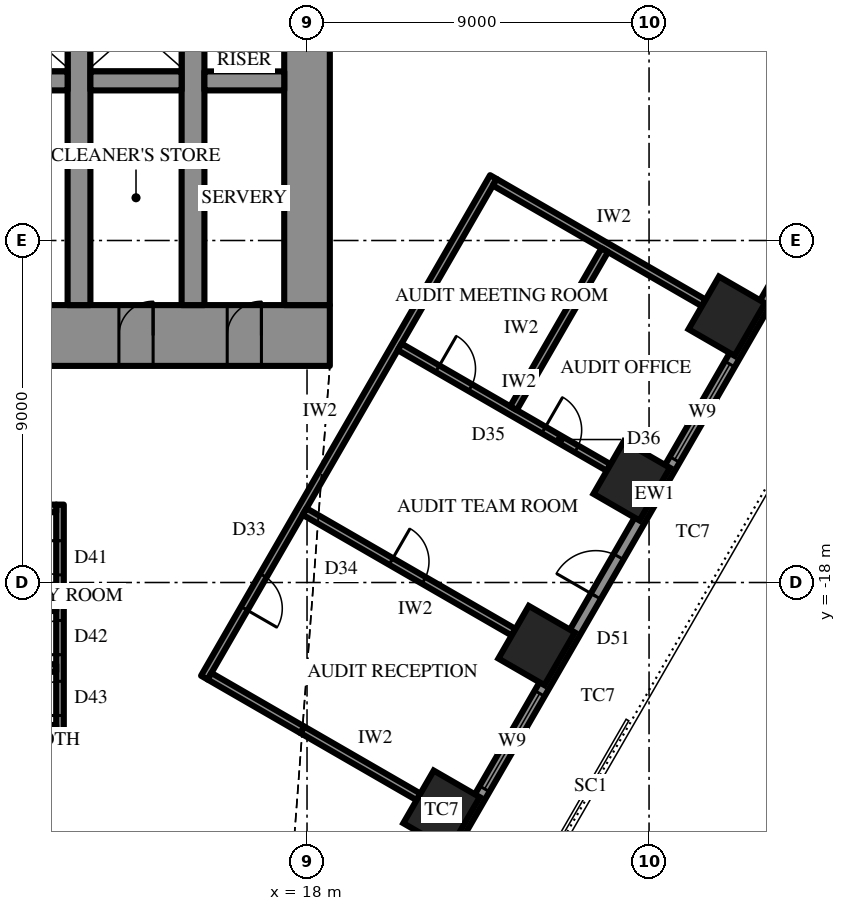
"""IFC4 building model, lengths in metres.
Left out: names, types, materials, properties, quantities, classifications, styles, units other than length and angle.
Written with IfcOpenShell. Run it as: python <this file> out.ifc"""

import sys

from ifc_helpers import new_model, si_unit, direction, frame, frame_2d, origin, origin_2d, place, context, subcontext, project, spatial, rectangle, extrude, element, fill, save


model = new_model("IFC4")
c1 = context("Model", 3, precision=1e-05, world=origin(), true_north=direction((0.0, 1.0)))
c2 = subcontext(c1, "Body", "Model", "MODEL_VIEW")
j1 = project(units=[si_unit("LENGTHUNIT", "METRE"), si_unit("PLANEANGLEUNIT", "RADIAN")], contexts=[c1])
p1 = place(None, origin())
s1 = spatial("IfcSite", under=j1, at=p1, CompositionType="ELEMENT")
p2 = place(p1, origin())
s2 = spatial("IfcBuilding", under=s1, at=p2, CompositionType="ELEMENT")
p3 = place(p2, frame((0.0, 0.0, 169.9)))
s3 = spatial("IfcBuildingStorey", under=s2, at=p3, CompositionType="ELEMENT", Elevation=169.9)
for number, where, z_axis, x_axis in (
    (1, (21.54, -23.992, 0.0), (0.0, 0.0, 1.0), (0.5, 0.866, 0.0)),
    (2, (24.042, -19.658, 0.0), (0.0, 0.0, 1.0), (0.5, 0.866, 0.0)),
    (3, (26.544, -15.325, 0.0), (0.0, 0.0, 1.0), (0.5, 0.866, 0.0)),
    (4, (29.045, -10.992, 0.0), (0.0, 0.0, 1.0), (0.5, 0.866, 0.0)),
):
    element("IfcColumn", number, at=place(p3, frame(where, z_axis=z_axis, x_axis=x_axis)), inside=s3, PredefinedType="COLUMN", context=c2, shape_type="SweptSolid", body=[
        extrude(rectangle(XDim=1.6, YDim=1.4, at=origin_2d()), origin(), (0.0, 0.0, 1.0), 4.2),
    ])
p4 = place(p3, frame((18.6, -11.5, 0.0), z_axis=(0.0, 0.0, 1.0), x_axis=(-1.0, 0.0, 0.0)))
e5 = element("IfcWall", 5, at=p4, inside=s3, PredefinedType="SHEAR", context=c2, shape_type="SweptSolid", body=[
    extrude(rectangle(XDim=37.2, YDim=1.6, at=frame_2d((18.6, 0.0))), origin(), (0.0, 0.0, 1.0), 4.2),
])
p5 = place(p4, frame((19.45, 0.0, 0.0)))
e6 = element("IfcOpeningElement", 6, at=p5, cuts=e5, PredefinedType="OPENING", context=c2, shape_type="SweptSolid", body=[
    extrude(rectangle(XDim=0.9, YDim=2.2, at=frame_2d((0.45, 1.1))), frame((0.0, 0.81, 0.0), z_axis=(0.0, -1.0, 0.0), x_axis=(1.0, 0.0, 0.0)), (0.0, 0.0, 1.0), 1.62),
])
p6 = place(p4, frame((22.45, 0.0, 0.0)))
e7 = element("IfcOpeningElement", 7, at=p6, cuts=e5, PredefinedType="OPENING", context=c2, shape_type="SweptSolid", body=[
    extrude(rectangle(XDim=0.9, YDim=2.2, at=frame_2d((0.45, 1.1))), frame((0.0, 0.81, 0.0), z_axis=(0.0, -1.0, 0.0), x_axis=(1.0, 0.0, 0.0)), (0.0, 0.0, 1.0), 1.62),
])
p7 = place(p4, frame((25.5, 0.0, 0.0)))
e8 = element("IfcOpeningElement", 8, at=p7, cuts=e5, PredefinedType="OPENING", context=c2, shape_type="SweptSolid", body=[
    extrude(rectangle(XDim=1.0, YDim=2.2, at=frame_2d((0.5, 1.1))), frame((0.0, 0.81, 0.0), z_axis=(0.0, -1.0, 0.0), x_axis=(1.0, 0.0, 0.0)), (0.0, 0.0, 1.0), 1.62),
])
p8 = place(p4, frame((1.8, 0.0, 0.0)))
e9 = element("IfcOpeningElement", 9, at=p8, cuts=e5, PredefinedType="OPENING", context=c2, shape_type="SweptSolid", body=[
    extrude(rectangle(XDim=0.9, YDim=2.2, at=frame_2d((0.45, 1.1))), frame((0.0, 0.81, 0.0), z_axis=(0.0, -1.0, 0.0), x_axis=(1.0, 0.0, 0.0)), (0.0, 0.0, 1.0), 1.62),
])
p9 = place(p4, frame((4.65, 0.0, 0.0)))
e10 = element("IfcOpeningElement", 10, at=p9, cuts=e5, PredefinedType="OPENING", context=c2, shape_type="SweptSolid", body=[
    extrude(rectangle(XDim=0.9, YDim=2.2, at=frame_2d((0.45, 1.1))), frame((0.0, 0.81, 0.0), z_axis=(0.0, -1.0, 0.0), x_axis=(1.0, 0.0, 0.0)), (0.0, 0.0, 1.0), 1.62),
])
p10 = place(p4, frame((7.75, 0.0, 0.0)))
e11 = element("IfcOpeningElement", 11, at=p10, cuts=e5, PredefinedType="OPENING", context=c2, shape_type="SweptSolid", body=[
    extrude(rectangle(XDim=0.9, YDim=2.2, at=frame_2d((0.45, 1.1))), frame((0.0, 0.81, 0.0), z_axis=(0.0, -1.0, 0.0), x_axis=(1.0, 0.0, 0.0)), (0.0, 0.0, 1.0), 1.62),
])
p11 = place(p4, frame((28.55, 0.0, 0.0)))
e12 = element("IfcOpeningElement", 12, at=p11, cuts=e5, PredefinedType="OPENING", context=c2, shape_type="SweptSolid", body=[
    extrude(rectangle(XDim=0.9, YDim=2.2, at=frame_2d((0.45, 1.1))), frame((0.0, 0.81, 0.0), z_axis=(0.0, -1.0, 0.0), x_axis=(1.0, 0.0, 0.0)), (0.0, 0.0, 1.0), 1.62),
])
p12 = place(p4, frame((31.65, 0.0, 0.0)))
e13 = element("IfcOpeningElement", 13, at=p12, cuts=e5, PredefinedType="OPENING", context=c2, shape_type="SweptSolid", body=[
    extrude(rectangle(XDim=0.9, YDim=2.2, at=frame_2d((0.45, 1.1))), frame((0.0, 0.81, 0.0), z_axis=(0.0, -1.0, 0.0), x_axis=(1.0, 0.0, 0.0)), (0.0, 0.0, 1.0), 1.62),
])
p13 = place(p4, frame((34.5, 0.0, 0.0)))
e14 = element("IfcOpeningElement", 14, at=p13, cuts=e5, PredefinedType="OPENING", context=c2, shape_type="SweptSolid", body=[
    extrude(rectangle(XDim=0.9, YDim=2.2, at=frame_2d((0.45, 1.1))), frame((0.0, 0.81, 0.0), z_axis=(0.0, -1.0, 0.0), x_axis=(1.0, 0.0, 0.0)), (0.0, 0.0, 1.0), 1.62),
])
p14 = place(p3, frame((18.0, -10.7, 0.0), z_axis=(0.0, 0.0, 1.0), x_axis=(0.0, 1.0, 0.0)))
e15 = element("IfcWall", 15, at=p14, inside=s3, PredefinedType="SHEAR", context=c2, shape_type="SweptSolid", body=[
    extrude(rectangle(XDim=21.4, YDim=1.2, at=frame_2d((10.7, 0.0))), origin(), (0.0, 0.0, 1.0), 4.2),
])
p15 = place(p14, frame((9.8, 0.0, 0.0)))
e16 = element("IfcOpeningElement", 16, at=p15, cuts=e15, PredefinedType="OPENING", context=c2, shape_type="SweptSolid", body=[
    extrude(rectangle(XDim=1.8, YDim=2.4, at=frame_2d((0.9, 1.2))), frame((0.0, 0.61, 0.0), z_axis=(0.0, -1.0, 0.0), x_axis=(1.0, 0.0, 0.0)), (0.0, 0.0, 1.0), 1.22),
])
p16 = place(p3, frame((12.0, -10.7, 0.0), z_axis=(0.0, 0.0, 1.0), x_axis=(0.0, 1.0, 0.0)))
e17 = element("IfcWall", 17, at=p16, inside=s3, PredefinedType="SHEAR", context=c2, shape_type="SweptSolid", body=[
    extrude(rectangle(XDim=21.4, YDim=0.6, at=frame_2d((10.7, 0.0))), origin(), (0.0, 0.0, 1.0), 4.2),
])
p17 = place(p16, frame((9.8, 0.0, 0.0)))
e18 = element("IfcOpeningElement", 18, at=p17, cuts=e17, PredefinedType="OPENING", context=c2, shape_type="SweptSolid", body=[
    extrude(rectangle(XDim=1.8, YDim=2.4, at=frame_2d((0.9, 1.2))), frame((0.0, 0.31, 0.0), z_axis=(0.0, -1.0, 0.0), x_axis=(1.0, 0.0, 0.0)), (0.0, 0.0, 1.0), 0.62),
])
p18 = place(p3, frame((15.0, -10.7, 0.0), z_axis=(0.0, 0.0, 1.0), x_axis=(0.0, 1.0, 0.0)))
e19 = element("IfcWall", 19, at=p18, inside=s3, PredefinedType="SHEAR", context=c2, shape_type="SweptSolid", body=[
    extrude(rectangle(XDim=21.4, YDim=0.6, at=frame_2d((10.7, 0.0))), origin(), (0.0, 0.0, 1.0), 4.2),
])
p19 = place(p18, frame((9.8, 0.0, 0.0)))
e20 = element("IfcOpeningElement", 20, at=p19, cuts=e19, PredefinedType="OPENING", context=c2, shape_type="SweptSolid", body=[
    extrude(rectangle(XDim=1.8, YDim=2.4, at=frame_2d((0.9, 1.2))), frame((0.0, 0.31, 0.0), z_axis=(0.0, -1.0, 0.0), x_axis=(1.0, 0.0, 0.0)), (0.0, 0.0, 1.0), 0.62),
])
p20 = place(p3, frame((17.4, -4.8, 0.0), z_axis=(0.0, 0.0, 1.0), x_axis=(-1.0, 0.0, 0.0)))
e21 = element("IfcWall", 21, at=p20, inside=s3, PredefinedType="SHEAR", context=c2, shape_type="SweptSolid", body=[
    extrude(rectangle(XDim=2.1, YDim=0.5, at=frame_2d((1.05, 0.0))), origin(), (0.0, 0.0, 1.0), 4.2),
])
p21 = place(p3, frame((14.7, -4.8, 0.0), z_axis=(0.0, 0.0, 1.0), x_axis=(-1.0, 0.0, 0.0)))
e22 = element("IfcWall", 22, at=p21, inside=s3, PredefinedType="SHEAR", context=c2, shape_type="SweptSolid", body=[
    extrude(rectangle(XDim=2.4, YDim=0.5, at=frame_2d((1.2, 0.0))), origin(), (0.0, 0.0, 1.0), 4.2),
])
p22 = place(p3, frame((11.7, -4.8, 0.0), z_axis=(0.0, 0.0, 1.0), x_axis=(-1.0, 0.0, 0.0)))
e23 = element("IfcWall", 23, at=p22, inside=s3, PredefinedType="SHEAR", context=c2, shape_type="SweptSolid", body=[
    extrude(rectangle(XDim=23.4, YDim=0.5, at=frame_2d((11.7, 0.0))), origin(), (0.0, 0.0, 1.0), 4.2),
])
p23 = place(p22, frame((6.6, 0.0, 0.0)))
e24 = element("IfcOpeningElement", 24, at=p23, cuts=e23, PredefinedType="OPENING", context=c2, shape_type="SweptSolid", body=[
    extrude(rectangle(XDim=1.2, YDim=2.2, at=frame_2d((0.6, 1.1))), frame((0.0, 0.26, 0.0), z_axis=(0.0, -1.0, 0.0), x_axis=(1.0, 0.0, 0.0)), (0.0, 0.0, 1.0), 0.52),
])
p24 = place(p22, frame((3.6, 0.0, 0.0)))
e25 = element("IfcOpeningElement", 25, at=p24, cuts=e23, PredefinedType="OPENING", context=c2, shape_type="SweptSolid", body=[
    extrude(rectangle(XDim=1.2, YDim=2.2, at=frame_2d((0.6, 1.1))), frame((0.0, 0.26, 0.0), z_axis=(0.0, -1.0, 0.0), x_axis=(1.0, 0.0, 0.0)), (0.0, 0.0, 1.0), 0.52),
])
p25 = place(p3, frame((19.644, -28.675, 0.0), z_axis=(0.0, 0.0, 1.0), x_axis=(0.500003084452, 0.866023622968, 0.0)))
e26 = element("IfcWall", 26, at=p25, inside=s3, PredefinedType="SOLIDWALL", context=c2, shape_type="SweptSolid", body=[
    extrude(rectangle(XDim=30.022, YDim=0.3, at=frame_2d((15.011, 0.0))), origin(), (0.0, 0.0, 1.0), 2.75),
])
p26 = place(p25, frame((1.052, 0.0, 0.6)))
e27 = element("IfcOpeningElement", 27, at=p26, cuts=e26, PredefinedType="OPENING", context=c2, shape_type="SweptSolid", body=[
    extrude(rectangle(XDim=2.9, YDim=1.9, at=frame_2d((1.45, 0.95))), frame((0.0, 0.16, 0.0), z_axis=(0.0, -1.0, 0.0), x_axis=(1.0, 0.0, 0.0)), (0.0, 0.0, 1.0), 0.32),
])
p27 = place(p25, frame((6.056, 0.0, 0.6)))
e28 = element("IfcOpeningElement", 28, at=p27, cuts=e26, PredefinedType="OPENING", context=c2, shape_type="SweptSolid", body=[
    extrude(rectangle(XDim=2.9, YDim=1.9, at=frame_2d((1.45, 0.95))), frame((0.0, 0.16, 0.0), z_axis=(0.0, -1.0, 0.0), x_axis=(1.0, 0.0, 0.0)), (0.0, 0.0, 1.0), 0.32),
])
p28 = place(p25, frame((11.909, 0.0, 0.0)))
e29 = element("IfcOpeningElement", 29, at=p28, cuts=e26, PredefinedType="OPENING", context=c2, shape_type="SweptSolid", body=[
    extrude(rectangle(XDim=1.2, YDim=2.4, at=frame_2d((0.6, 1.2))), frame((0.0, 0.16, 0.0), z_axis=(0.0, -1.0, 0.0), x_axis=(1.0, 0.0, 0.0)), (0.0, 0.0, 1.0), 0.32),
])
p29 = place(p25, frame((16.063, 0.0, 0.6)))
e30 = element("IfcOpeningElement", 30, at=p29, cuts=e26, PredefinedType="OPENING", context=c2, shape_type="SweptSolid", body=[
    extrude(rectangle(XDim=2.9, YDim=1.9, at=frame_2d((1.45, 0.95))), frame((0.0, 0.16, 0.0), z_axis=(0.0, -1.0, 0.0), x_axis=(1.0, 0.0, 0.0)), (0.0, 0.0, 1.0), 0.32),
])
p30 = place(p25, frame((21.067, 0.0, 0.6)))
e31 = element("IfcOpeningElement", 31, at=p30, cuts=e26, PredefinedType="OPENING", context=c2, shape_type="SweptSolid", body=[
    extrude(rectangle(XDim=2.9, YDim=1.9, at=frame_2d((1.45, 0.95))), frame((0.0, 0.16, 0.0), z_axis=(0.0, -1.0, 0.0), x_axis=(1.0, 0.0, 0.0)), (0.0, 0.0, 1.0), 0.32),
])
p31 = place(p25, frame((26.07, 0.0, 0.6)))
e32 = element("IfcOpeningElement", 32, at=p31, cuts=e26, PredefinedType="OPENING", context=c2, shape_type="SweptSolid", body=[
    extrude(rectangle(XDim=2.9, YDim=1.9, at=frame_2d((1.45, 0.95))), frame((0.0, 0.16, 0.0), z_axis=(0.0, -1.0, 0.0), x_axis=(1.0, 0.0, 0.0)), (0.0, 0.0, 1.0), 0.32),
])
p32 = place(p3, frame((15.298, -20.503, 0.0), z_axis=(0.0, 0.0, 1.0), x_axis=(0.500010972563, 0.86601906868, 0.0)))
e33 = element("IfcWall", 33, at=p32, inside=s3, PredefinedType="PARTITIONING", context=c2, shape_type="SweptSolid", body=[
    extrude(rectangle(XDim=15.211, YDim=0.2, at=frame_2d((7.605, 0.0))), origin(), (0.0, 0.0, 1.0), 4.0),
])
p33 = place(p32, frame((2.102, 0.0, 0.0)))
e34 = element("IfcOpeningElement", 34, at=p33, cuts=e33, PredefinedType="OPENING", context=c2, shape_type="SweptSolid", body=[
    extrude(rectangle(XDim=1.0, YDim=2.2, at=frame_2d((0.5, 1.1))), frame((0.0, 0.11, 0.0), z_axis=(0.0, -1.0, 0.0), x_axis=(1.0, 0.0, 0.0)), (0.0, 0.0, 1.0), 0.22),
])
p34 = place(p3, frame((15.435, -20.467, 0.0), z_axis=(0.0, 0.0, 1.0), x_axis=(0.866008320966, -0.500029587143, 0.0)))
e35 = element("IfcWall", 35, at=p34, inside=s3, PredefinedType="PARTITIONING", context=c2, shape_type="SweptSolid", body=[
    extrude(rectangle(XDim=2.821, YDim=0.2, at=frame_2d((1.411, 0.0))), origin(), (0.0, 0.0, 1.0), 4.0),
])
p35 = place(p3, frame((17.878, -21.877, 0.0), z_axis=(0.0, 0.0, 1.0), x_axis=(0.866033512162, -0.499985955615, 0.0)))
e36 = element("IfcWall", 36, at=p35, inside=s3, PredefinedType="PARTITIONING", context=c2, shape_type="SweptSolid", body=[
    extrude(rectangle(XDim=3.529, YDim=0.2, at=frame_2d((1.764, 0.0))), origin(), (0.0, 0.0, 1.0), 3.082),
])
p36 = place(p3, frame((17.936, -16.133, 0.0), z_axis=(0.0, 0.0, 1.0), x_axis=(0.866022320763, -0.500005339912, 0.0)))
e37 = element("IfcWall", 37, at=p36, inside=s3, PredefinedType="PARTITIONING", context=c2, shape_type="SweptSolid", body=[
    extrude(rectangle(XDim=6.35, YDim=0.2, at=frame_2d((3.175, 0.0))), origin(), (0.0, 0.0, 1.0), 3.082),
])
p37 = place(p36, frame((2.625, 0.0, 0.0)))
e38 = element("IfcOpeningElement", 38, at=p37, cuts=e37, PredefinedType="OPENING", context=c2, shape_type="SweptSolid", body=[
    extrude(rectangle(XDim=1.0, YDim=2.2, at=frame_2d((0.5, 1.1))), frame((0.0, 0.11, 0.0), z_axis=(0.0, -1.0, 0.0), x_axis=(1.0, 0.0, 0.0)), (0.0, 0.0, 1.0), 0.22),
])
p38 = place(p3, frame((20.438, -11.8, 0.0), z_axis=(0.0, 0.0, 1.0), x_axis=(0.866022320763, -0.500005339912, 0.0)))
e39 = element("IfcWall", 39, at=p38, inside=s3, PredefinedType="PARTITIONING", context=c2, shape_type="SweptSolid", body=[
    extrude(rectangle(XDim=6.35, YDim=0.2, at=frame_2d((3.175, 0.0))), origin(), (0.0, 0.0, 1.0), 4.0),
])
p39 = place(p38, frame((1.15, 0.0, 0.0)))
e40 = element("IfcOpeningElement", 40, at=p39, cuts=e39, PredefinedType="OPENING", context=c2, shape_type="SweptSolid", body=[
    extrude(rectangle(XDim=1.0, YDim=2.2, at=frame_2d((0.5, 1.1))), frame((0.0, 0.11, 0.0), z_axis=(0.0, -1.0, 0.0), x_axis=(1.0, 0.0, 0.0)), (0.0, 0.0, 1.0), 0.22),
])
p40 = place(p38, frame((4.375, 0.0, 0.0)))
e41 = element("IfcOpeningElement", 41, at=p40, cuts=e39, PredefinedType="OPENING", context=c2, shape_type="SweptSolid", body=[
    extrude(rectangle(XDim=1.0, YDim=2.2, at=frame_2d((0.5, 1.1))), frame((0.0, 0.11, 0.0), z_axis=(0.0, -1.0, 0.0), x_axis=(1.0, 0.0, 0.0)), (0.0, 0.0, 1.0), 0.22),
])
p41 = place(p3, frame((22.94, -7.467, 0.0), z_axis=(0.0, 0.0, 1.0), x_axis=(0.866022320763, -0.500005339912, 0.0)))
e42 = element("IfcWall", 42, at=p41, inside=s3, PredefinedType="PARTITIONING", context=c2, shape_type="SweptSolid", body=[
    extrude(rectangle(XDim=6.35, YDim=0.2, at=frame_2d((3.175, 0.0))), origin(), (0.0, 0.0, 1.0), 3.082),
])
p42 = place(p3, frame((23.433, -13.413, 0.0), z_axis=(0.0, 0.0, 1.0), x_axis=(0.499998147991, 0.86602647304, 0.0)))
e43 = element("IfcWall", 43, at=p42, inside=s3, PredefinedType="PARTITIONING", context=c2, shape_type="SweptSolid", body=[
    extrude(rectangle(XDim=4.804, YDim=0.2, at=frame_2d((2.402, 0.0))), origin(), (0.0, 0.0, 1.0), 4.0),
])
p43 = place(p3, frame((11.5, -15.95, 0.0), z_axis=(0.0, 0.0, 1.0), x_axis=(0.0, -1.0, 0.0)))
e44 = element("IfcWall", 44, at=p43, inside=s3, PredefinedType="PARTITIONING", context=c2, shape_type="SweptSolid", body=[
    extrude(rectangle(XDim=6.0, YDim=0.2, at=frame_2d((3.0, 0.0))), origin(), (0.0, 0.0, 1.0), 4.0),
])
p44 = place(p43, frame((0.95, 0.0, 0.0)))
e45 = element("IfcOpeningElement", 45, at=p44, cuts=e44, PredefinedType="OPENING", context=c2, shape_type="SweptSolid", body=[
    extrude(rectangle(XDim=0.9, YDim=2.2, at=frame_2d((0.45, 1.1))), frame((0.0, 0.11, 0.0), z_axis=(0.0, -1.0, 0.0), x_axis=(1.0, 0.0, 0.0)), (0.0, 0.0, 1.0), 0.22),
])
p45 = place(p43, frame((3.05, 0.0, 0.0)))
e46 = element("IfcOpeningElement", 46, at=p45, cuts=e44, PredefinedType="OPENING", context=c2, shape_type="SweptSolid", body=[
    extrude(rectangle(XDim=0.9, YDim=2.2, at=frame_2d((0.45, 1.1))), frame((0.0, 0.11, 0.0), z_axis=(0.0, -1.0, 0.0), x_axis=(1.0, 0.0, 0.0)), (0.0, 0.0, 1.0), 0.22),
])
p46 = place(p43, frame((4.65, 0.0, 0.0)))
e47 = element("IfcOpeningElement", 47, at=p46, cuts=e44, PredefinedType="OPENING", context=c2, shape_type="SweptSolid", body=[
    extrude(rectangle(XDim=0.9, YDim=2.2, at=frame_2d((0.45, 1.1))), frame((0.0, 0.11, 0.0), z_axis=(0.0, -1.0, 0.0), x_axis=(1.0, 0.0, 0.0)), (0.0, 0.0, 1.0), 0.22),
])
for number, where, z_axis, x_axis in (
    (48, (9.1, -16.05, 0.0), (0.0, 0.0, 1.0), (1.0, 0.0, 0.0)),
    (49, (9.1, -18.65, 0.0), (0.0, 0.0, 1.0), (1.0, 0.0, 0.0)),
    (50, (9.1, -20.25, 0.0), (0.0, 0.0, 1.0), (1.0, 0.0, 0.0)),
    (51, (9.1, -21.85, 0.0), (0.0, 0.0, 1.0), (1.0, 0.0, 0.0)),
):
    element("IfcWall", number, at=place(p3, frame(where, z_axis=z_axis, x_axis=x_axis)), inside=s3, PredefinedType="PARTITIONING", context=c2, shape_type="SweptSolid", body=[
        extrude(rectangle(XDim=2.3, YDim=0.2, at=frame_2d((1.15, 0.0))), origin(), (0.0, 0.0, 1.0), 4.0),
    ])
p47 = place(p27, origin())
e52 = element("IfcWindow", 52, at=p47, inside=s3, PartitioningType="SINGLE_PANEL", PredefinedType="WINDOW", context=c2, shape_type="SweptSolid", body=[
    extrude(rectangle(XDim=2.9, YDim=1.9, at=frame_2d((1.45, 0.95))), frame((0.0, 0.03, 0.0), z_axis=(0.0, -1.0, 0.0), x_axis=(1.0, 0.0, 0.0)), (0.0, 0.0, 1.0), 0.06),
])
fill(e28, e52)
p48 = place(p28, origin())
e53 = element("IfcDoor", 53, at=p48, inside=s3, OperationType="SINGLE_SWING_RIGHT", PredefinedType="DOOR", context=c2, shape_type="SweptSolid", body=[
    extrude(rectangle(XDim=1.2, YDim=2.4, at=frame_2d((0.6, 1.2))), frame((0.0, 0.025, 0.0), z_axis=(0.0, -1.0, 0.0), x_axis=(1.0, 0.0, 0.0)), (0.0, 0.0, 1.0), 0.05),
])
fill(e29, e53)
p49 = place(p29, origin())
e54 = element("IfcWindow", 54, at=p49, inside=s3, PartitioningType="SINGLE_PANEL", PredefinedType="WINDOW", context=c2, shape_type="SweptSolid", body=[
    extrude(rectangle(XDim=2.9, YDim=1.9, at=frame_2d((1.45, 0.95))), frame((0.0, 0.03, 0.0), z_axis=(0.0, -1.0, 0.0), x_axis=(1.0, 0.0, 0.0)), (0.0, 0.0, 1.0), 0.06),
])
fill(e30, e54)
p50 = place(p8, frame((0.9, 0.0, 0.0), z_axis=(0.0, 0.0, 1.0), x_axis=(-1.0, 0.0, 0.0)))
e55 = element("IfcDoor", 55, at=p50, inside=s3, OperationType="SINGLE_SWING_LEFT", PredefinedType="DOOR", context=c2, shape_type="SweptSolid", body=[
    extrude(rectangle(XDim=0.9, YDim=2.2, at=frame_2d((0.45, 1.1))), frame((0.0, 0.025, 0.0), z_axis=(0.0, -1.0, 0.0), x_axis=(1.0, 0.0, 0.0)), (0.0, 0.0, 1.0), 0.05),
])
fill(e9, e55)
p51 = place(p9, frame((0.9, 0.0, 0.0), z_axis=(0.0, 0.0, 1.0), x_axis=(-1.0, 0.0, 0.0)))
e56 = element("IfcDoor", 56, at=p51, inside=s3, OperationType="SINGLE_SWING_LEFT", PredefinedType="DOOR", context=c2, shape_type="SweptSolid", body=[
    extrude(rectangle(XDim=0.9, YDim=2.2, at=frame_2d((0.45, 1.1))), frame((0.0, 0.025, 0.0), z_axis=(0.0, -1.0, 0.0), x_axis=(1.0, 0.0, 0.0)), (0.0, 0.0, 1.0), 0.05),
])
fill(e10, e56)
p52 = place(p33, frame((1.0, 0.0, 0.0), z_axis=(0.0, 0.0, 1.0), x_axis=(-1.0, 0.0, 0.0)))
e57 = element("IfcDoor", 57, at=p52, inside=s3, OperationType="SINGLE_SWING_LEFT", PredefinedType="DOOR", context=c2, shape_type="SweptSolid", body=[
    extrude(rectangle(XDim=1.0, YDim=2.2, at=frame_2d((0.5, 1.1))), frame((0.0, 0.025, 0.0), z_axis=(0.0, -1.0, 0.0), x_axis=(1.0, 0.0, 0.0)), (0.0, 0.0, 1.0), 0.05),
])
fill(e34, e57)
p53 = place(p37, origin())
e58 = element("IfcDoor", 58, at=p53, inside=s3, OperationType="SINGLE_SWING_RIGHT", PredefinedType="DOOR", context=c2, shape_type="SweptSolid", body=[
    extrude(rectangle(XDim=1.0, YDim=2.2, at=frame_2d((0.5, 1.1))), frame((0.0, 0.025, 0.0), z_axis=(0.0, -1.0, 0.0), x_axis=(1.0, 0.0, 0.0)), (0.0, 0.0, 1.0), 0.05),
])
fill(e38, e58)
p54 = place(p39, origin())
e59 = element("IfcDoor", 59, at=p54, inside=s3, OperationType="SINGLE_SWING_RIGHT", PredefinedType="DOOR", context=c2, shape_type="SweptSolid", body=[
    extrude(rectangle(XDim=1.0, YDim=2.2, at=frame_2d((0.5, 1.1))), frame((0.0, 0.025, 0.0), z_axis=(0.0, -1.0, 0.0), x_axis=(1.0, 0.0, 0.0)), (0.0, 0.0, 1.0), 0.05),
])
fill(e40, e59)
p55 = place(p40, origin())
e60 = element("IfcDoor", 60, at=p55, inside=s3, OperationType="SINGLE_SWING_RIGHT", PredefinedType="DOOR", context=c2, shape_type="SweptSolid", body=[
    extrude(rectangle(XDim=1.0, YDim=2.2, at=frame_2d((0.5, 1.1))), frame((0.0, 0.025, 0.0), z_axis=(0.0, -1.0, 0.0), x_axis=(1.0, 0.0, 0.0)), (0.0, 0.0, 1.0), 0.05),
])
fill(e41, e60)
p56 = place(p44, frame((0.9, 0.0, 0.0), z_axis=(0.0, 0.0, 1.0), x_axis=(-1.0, 0.0, 0.0)))
e61 = element("IfcDoor", 61, at=p56, inside=s3, OperationType="SINGLE_SWING_LEFT", PredefinedType="DOOR", context=c2, shape_type="SweptSolid", body=[
    extrude(rectangle(XDim=0.9, YDim=2.2, at=frame_2d((0.45, 1.1))), frame((0.0, 0.025, 0.0), z_axis=(0.0, -1.0, 0.0), x_axis=(1.0, 0.0, 0.0)), (0.0, 0.0, 1.0), 0.05),
])
fill(e45, e61)
p57 = place(p45, frame((0.9, 0.0, 0.0), z_axis=(0.0, 0.0, 1.0), x_axis=(-1.0, 0.0, 0.0)))
e62 = element("IfcDoor", 62, at=p57, inside=s3, OperationType="SINGLE_SWING_RIGHT", PredefinedType="DOOR", context=c2, shape_type="SweptSolid", body=[
    extrude(rectangle(XDim=0.9, YDim=2.2, at=frame_2d((0.45, 1.1))), frame((0.0, 0.025, 0.0), z_axis=(0.0, -1.0, 0.0), x_axis=(1.0, 0.0, 0.0)), (0.0, 0.0, 1.0), 0.05),
])
fill(e46, e62)
p58 = place(p46, frame((0.9, 0.0, 0.0), z_axis=(0.0, 0.0, 1.0), x_axis=(-1.0, 0.0, 0.0)))
e63 = element("IfcDoor", 63, at=p58, inside=s3, OperationType="SINGLE_SWING_RIGHT", PredefinedType="DOOR", context=c2, shape_type="SweptSolid", body=[
    extrude(rectangle(XDim=0.9, YDim=2.2, at=frame_2d((0.45, 1.1))), frame((0.0, 0.025, 0.0), z_axis=(0.0, -1.0, 0.0), x_axis=(1.0, 0.0, 0.0)), (0.0, 0.0, 1.0), 0.05),
])
fill(e47, e63)
save(model, sys.argv[1])
